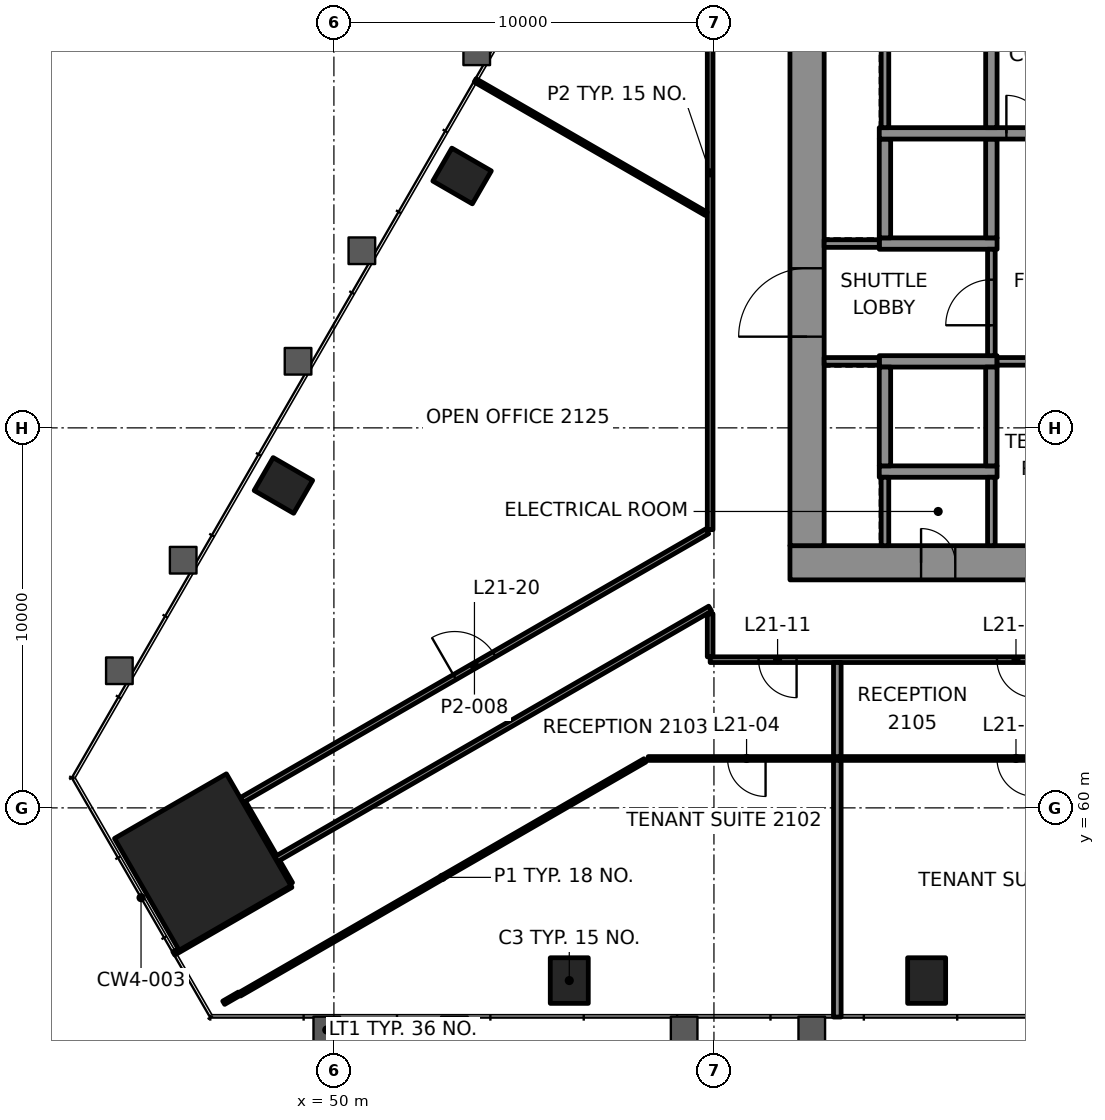
"""IFC4 building model, lengths in metres.
Left out: names, types, materials, properties, quantities, classifications, styles, units other than length and angle.
Written with IfcOpenShell. Run it as: python <this file> out.ifc"""

import sys

from ifc_helpers import new_model, si_unit, direction, frame, frame_2d, origin, origin_2d, place, context, subcontext, project, spatial, rectangle, extrude, element, fill, save


model = new_model("IFC4")
c1 = context("Model", 3, precision=1e-05, world=origin(), true_north=direction((0.0, 1.0)))
c2 = subcontext(c1, "Body", "Model", "MODEL_VIEW")
j1 = project(units=[si_unit("LENGTHUNIT", "METRE"), si_unit("PLANEANGLEUNIT", "RADIAN")], contexts=[c1])
p1 = place(None, origin())
s1 = spatial("IfcSite", under=j1, at=p1, CompositionType="ELEMENT")
p2 = place(p1, origin())
s2 = spatial("IfcBuilding", under=s1, at=p2, CompositionType="ELEMENT")
p3 = place(p2, frame((0.0, 0.0, 94.6)))
s3 = spatial("IfcBuildingStorey", under=s2, at=p3, CompositionType="ELEMENT", Elevation=94.6)
p4 = place(p3, frame((46.549, 58.574, 0.0), z_axis=(0.0, 0.0, 1.0), x_axis=(0.5, -0.866025403784, 0.0)))
e1 = element("IfcColumn", 1, at=p4, inside=s3, PredefinedType="COLUMN", context=c2, shape_type="SweptSolid", body=[
    extrude(rectangle(XDim=3.4, YDim=3.4, at=origin_2d()), origin(), (0.0, 0.0, 1.0), 4.2),
])
for number, where, z_axis, x_axis in (
    (2, (56.193, 55.456, -0.0), (0.0, 0.0, 1.0), (1.0, 0.0, 0.0)),
    (3, (65.597, 55.456, -0.0), (0.0, 0.0, 1.0), (1.0, 0.0, 0.0)),
    (4, (53.373, 76.628, -0.0), (0.0, 0.0, 1.0), (-0.5, -0.866, 0.0)),
    (5, (48.671, 68.485, -0.0), (0.0, 0.0, 1.0), (-0.5, -0.866, 0.0)),
):
    element("IfcColumn", number, at=place(p3, frame(where, z_axis=z_axis, x_axis=x_axis)), inside=s3, PredefinedType="COLUMN", context=c2, shape_type="SweptSolid", body=[
        extrude(rectangle(XDim=1.0, YDim=1.2, at=origin_2d()), origin(), (0.0, 0.0, 1.0), 4.2),
    ])
p5 = place(p3, frame((62.0, 66.45, 0.0), z_axis=(0.0, 0.0, 1.0), x_axis=(1.0, 0.0, 0.0)))
e6 = element("IfcWall", 6, at=p5, inside=s3, PredefinedType="SHEAR", context=c2, shape_type="SweptSolid", body=[
    extrude(rectangle(XDim=26.0, YDim=0.9, at=frame_2d((13.0, 0.0))), origin(), (0.0, 0.0, 1.0), 4.0),
])
p6 = place(p5, frame((3.45, 0.0, 0.0)))
e7 = element("IfcOpeningElement", 7, at=p6, cuts=e6, PredefinedType="OPENING", context=c2, shape_type="SweptSolid", body=[
    extrude(rectangle(XDim=0.9, YDim=2.1, at=frame_2d((0.45, 1.05))), frame((0.0, 0.46, 0.0), z_axis=(0.0, -1.0, 0.0), x_axis=(1.0, 0.0, 0.0)), (0.0, 0.0, 1.0), 0.92),
])
p7 = place(p5, frame((6.425, 0.0, 0.0)))
e8 = element("IfcOpeningElement", 8, at=p7, cuts=e6, PredefinedType="OPENING", context=c2, shape_type="SweptSolid", body=[
    extrude(rectangle(XDim=0.9, YDim=2.1, at=frame_2d((0.45, 1.05))), frame((0.0, 0.46, 0.0), z_axis=(0.0, -1.0, 0.0), x_axis=(1.0, 0.0, 0.0)), (0.0, 0.0, 1.0), 0.92),
])
p8 = place(p5, frame((11.5, 0.0, 0.0)))
e9 = element("IfcOpeningElement", 9, at=p8, cuts=e6, PredefinedType="OPENING", context=c2, shape_type="SweptSolid", body=[
    extrude(rectangle(XDim=0.9, YDim=2.1, at=frame_2d((0.45, 1.05))), frame((0.0, 0.46, 0.0), z_axis=(0.0, -1.0, 0.0), x_axis=(1.0, 0.0, 0.0)), (0.0, 0.0, 1.0), 0.92),
])
p9 = place(p5, frame((18.5, 0.0, 0.0)))
e10 = element("IfcOpeningElement", 10, at=p9, cuts=e6, PredefinedType="OPENING", context=c2, shape_type="SweptSolid", body=[
    extrude(rectangle(XDim=0.9, YDim=2.1, at=frame_2d((0.45, 1.05))), frame((0.0, 0.46, 0.0), z_axis=(0.0, -1.0, 0.0), x_axis=(1.0, 0.0, 0.0)), (0.0, 0.0, 1.0), 0.92),
])
p10 = place(p5, frame((23.325, 0.0, 0.0)))
e11 = element("IfcOpeningElement", 11, at=p10, cuts=e6, PredefinedType="OPENING", context=c2, shape_type="SweptSolid", body=[
    extrude(rectangle(XDim=0.9, YDim=2.1, at=frame_2d((0.45, 1.05))), frame((0.0, 0.46, 0.0), z_axis=(0.0, -1.0, 0.0), x_axis=(1.0, 0.0, 0.0)), (0.0, 0.0, 1.0), 0.92),
])
p11 = place(p3, frame((62.45, 66.9, 0.0), z_axis=(0.0, 0.0, 1.0), x_axis=(0.0, 1.0, 0.0)))
e12 = element("IfcWall", 12, at=p11, inside=s3, PredefinedType="SHEAR", context=c2, shape_type="SweptSolid", body=[
    extrude(rectangle(XDim=16.2, YDim=0.9, at=frame_2d((8.1, 0.0))), origin(), (0.0, 0.0, 1.0), 4.0),
])
p12 = place(p11, frame((5.5, 0.0, 0.0)))
e13 = element("IfcOpeningElement", 13, at=p12, cuts=e12, PredefinedType="OPENING", context=c2, shape_type="SweptSolid", body=[
    extrude(rectangle(XDim=1.8, YDim=2.1, at=frame_2d((0.9, 1.05))), frame((0.0, 0.46, 0.0), z_axis=(0.0, -1.0, 0.0), x_axis=(1.0, 0.0, 0.0)), (0.0, 0.0, 1.0), 0.92),
])
for number, where, z_axis, x_axis in (
    (14, (64.35, 68.85, 0.0), (0.0, 0.0, 1.0), (1.0, 0.0, 0.0)),
    (15, (64.35, 71.75, 0.0), (0.0, 0.0, 1.0), (1.0, 0.0, 0.0)),
    (16, (64.35, 74.85, 0.0), (0.0, 0.0, 1.0), (1.0, 0.0, 0.0)),
):
    element("IfcWall", number, at=place(p3, frame(where, z_axis=z_axis, x_axis=x_axis)), inside=s3, PredefinedType="SHEAR", context=c2, shape_type="SweptSolid", body=[
        extrude(rectangle(XDim=3.1, YDim=0.3, at=frame_2d((1.55, 0.0))), origin(), (0.0, 0.0, 1.0), 4.0),
    ])
for number, where, z_axis, x_axis in (
    (17, (64.5, 69.0, 0.0), (0.0, 0.0, 1.0), (0.0, 1.0, 0.0)),
    (18, (64.5, 75.0, 0.0), (0.0, 0.0, 1.0), (0.0, 1.0, 0.0)),
    (19, (67.3, 69.0, 0.0), (0.0, 0.0, 1.0), (0.0, 1.0, 0.0)),
    (20, (67.3, 75.0, 0.0), (0.0, 0.0, 1.0), (0.0, 1.0, 0.0)),
):
    element("IfcWall", number, at=place(p3, frame(where, z_axis=z_axis, x_axis=x_axis)), inside=s3, PredefinedType="SHEAR", context=c2, shape_type="SweptSolid", body=[
        extrude(rectangle(XDim=2.6, YDim=0.3, at=frame_2d((1.3, 0.0))), origin(), (0.0, 0.0, 1.0), 4.0),
    ])
p13 = place(p3, frame((64.35, 77.75, 0.0), z_axis=(0.0, 0.0, 1.0), x_axis=(1.0, 0.0, 0.0)))
e21 = element("IfcWall", 21, at=p13, inside=s3, PredefinedType="SHEAR", context=c2, shape_type="SweptSolid", body=[
    extrude(rectangle(XDim=22.75, YDim=0.3, at=frame_2d((11.375, 0.0))), origin(), (0.0, 0.0, 1.0), 4.0),
])
p14 = place(p13, frame((3.345, 0.0, 0.0)))
e22 = element("IfcOpeningElement", 22, at=p14, cuts=e21, PredefinedType="OPENING", context=c2, shape_type="SweptSolid", body=[
    extrude(rectangle(XDim=1.0, YDim=2.1, at=frame_2d((0.5, 1.05))), frame((0.0, 0.16, 0.0), z_axis=(0.0, -1.0, 0.0), x_axis=(1.0, 0.0, 0.0)), (0.0, 0.0, 1.0), 0.32),
])
p15 = place(p3, frame((67.3, 77.9, 0.0), z_axis=(0.0, 0.0, 1.0), x_axis=(0.0, 1.0, 0.0)))
e23 = element("IfcWall", 23, at=p15, inside=s3, PredefinedType="SHEAR", context=c2, shape_type="SweptSolid", body=[
    extrude(rectangle(XDim=3.08, YDim=0.3, at=frame_2d((1.54, 0.0))), origin(), (0.0, 0.0, 1.0), 4.0),
])
p16 = place(p3, frame((84.403, 61.3, 0.0), z_axis=(0.0, 0.0, 1.0), x_axis=(-1.0, 0.0, 0.0)))
e24 = element("IfcWall", 24, at=p16, inside=s3, PredefinedType="PARTITIONING", context=c2, shape_type="SweptSolid", body=[
    extrude(rectangle(XDim=26.132, YDim=0.1, at=frame_2d((13.066, 0.0))), origin(), (0.0, 0.0, 1.0), 3.4),
])
p17 = place(p16, frame((2.59, 0.0, 0.0)))
e25 = element("IfcOpeningElement", 25, at=p17, cuts=e24, PredefinedType="OPENING", context=c2, shape_type="SweptSolid", body=[
    extrude(rectangle(XDim=0.9, YDim=2.1, at=frame_2d((0.45, 1.05))), frame((0.0, 0.06, 0.0), z_axis=(0.0, -1.0, 0.0), x_axis=(1.0, 0.0, 0.0)), (0.0, 0.0, 1.0), 0.12),
])
p18 = place(p16, frame((8.364, 0.0, 0.0)))
e26 = element("IfcOpeningElement", 26, at=p18, cuts=e24, PredefinedType="OPENING", context=c2, shape_type="SweptSolid", body=[
    extrude(rectangle(XDim=0.9, YDim=2.1, at=frame_2d((0.45, 1.05))), frame((0.0, 0.06, 0.0), z_axis=(0.0, -1.0, 0.0), x_axis=(1.0, 0.0, 0.0)), (0.0, 0.0, 1.0), 0.12),
])
p19 = place(p16, frame((15.956, 0.0, 0.0)))
e27 = element("IfcOpeningElement", 27, at=p19, cuts=e24, PredefinedType="OPENING", context=c2, shape_type="SweptSolid", body=[
    extrude(rectangle(XDim=1.0, YDim=2.1, at=frame_2d((0.5, 1.05))), frame((0.0, 0.06, 0.0), z_axis=(0.0, -1.0, 0.0), x_axis=(1.0, 0.0, 0.0)), (0.0, 0.0, 1.0), 0.12),
])
p20 = place(p16, frame((23.045, 0.0, 0.0)))
e28 = element("IfcOpeningElement", 28, at=p20, cuts=e24, PredefinedType="OPENING", context=c2, shape_type="SweptSolid", body=[
    extrude(rectangle(XDim=1.0, YDim=2.1, at=frame_2d((0.5, 1.05))), frame((0.0, 0.06, 0.0), z_axis=(0.0, -1.0, 0.0), x_axis=(1.0, 0.0, 0.0)), (0.0, 0.0, 1.0), 0.12),
])
p21 = place(p3, frame((90.1, 63.9, 0.0), z_axis=(0.0, 0.0, 1.0), x_axis=(-1.0, 0.0, 0.0)))
e29 = element("IfcWall", 29, at=p21, inside=s3, PredefinedType="PARTITIONING", context=c2, shape_type="SweptSolid", body=[
    extrude(rectangle(XDim=30.2, YDim=0.15, at=frame_2d((15.1, 0.0))), origin(), (0.0, 0.0, 1.0), 3.4),
])
p22 = place(p21, frame((2.35, 0.0, 0.0)))
e30 = element("IfcOpeningElement", 30, at=p22, cuts=e29, PredefinedType="OPENING", context=c2, shape_type="SweptSolid", body=[
    extrude(rectangle(XDim=1.2, YDim=2.1, at=frame_2d((0.6, 1.05))), frame((0.0, 0.085, 0.0), z_axis=(0.0, -1.0, 0.0), x_axis=(1.0, 0.0, 0.0)), (0.0, 0.0, 1.0), 0.17),
])
p23 = place(p21, frame((11.074, 0.0, 0.0)))
e31 = element("IfcOpeningElement", 31, at=p23, cuts=e29, PredefinedType="OPENING", context=c2, shape_type="SweptSolid", body=[
    extrude(rectangle(XDim=1.0, YDim=2.1, at=frame_2d((0.5, 1.05))), frame((0.0, 0.085, 0.0), z_axis=(0.0, -1.0, 0.0), x_axis=(1.0, 0.0, 0.0)), (0.0, 0.0, 1.0), 0.17),
])
p24 = place(p21, frame((21.653, 0.0, 0.0)))
e32 = element("IfcOpeningElement", 32, at=p24, cuts=e29, PredefinedType="OPENING", context=c2, shape_type="SweptSolid", body=[
    extrude(rectangle(XDim=1.0, YDim=2.1, at=frame_2d((0.5, 1.05))), frame((0.0, 0.085, 0.0), z_axis=(0.0, -1.0, 0.0), x_axis=(1.0, 0.0, 0.0)), (0.0, 0.0, 1.0), 0.17),
])
p25 = place(p21, frame((27.925, 0.0, 0.0)))
e33 = element("IfcOpeningElement", 33, at=p25, cuts=e29, PredefinedType="OPENING", context=c2, shape_type="SweptSolid", body=[
    extrude(rectangle(XDim=1.0, YDim=2.1, at=frame_2d((0.5, 1.05))), frame((0.0, 0.085, 0.0), z_axis=(0.0, -1.0, 0.0), x_axis=(1.0, 0.0, 0.0)), (0.0, 0.0, 1.0), 0.17),
])
p26 = place(p3, frame((47.519, 55.093, 0.0), z_axis=(0.0, 0.0, 1.0), x_axis=(0.866028767292, 0.499994174189, 0.0)))
e34 = element("IfcWall", 34, at=p26, inside=s3, PredefinedType="PARTITIONING", context=c2, shape_type="SweptSolid", body=[
    extrude(rectangle(XDim=12.315, YDim=0.1, at=frame_2d((6.157, 0.0))), origin(), (0.0, 0.0, 1.0), 3.4),
])
p27 = place(p3, frame((47.1, 54.873, 0.0), z_axis=(0.0, 0.0, 1.0), x_axis=(0.865944638795, 0.50013986298, 0.0)))
e35 = element("IfcWall", 35, at=p27, inside=s3, PredefinedType="PARTITIONING", context=c2, shape_type="SweptSolid", body=[
    extrude(rectangle(XDim=0.472, YDim=0.1, at=frame_2d((0.236, 0.0))), origin(), (0.0, 0.0, 1.0), 3.4),
])
p28 = place(p3, frame((45.788, 56.171, 0.0), z_axis=(0.0, 0.0, 1.0), x_axis=(0.866031398331, 0.499989616998, 0.0)))
e36 = element("IfcWall", 36, at=p28, inside=s3, PredefinedType="PARTITIONING", context=c2, shape_type="SweptSolid", body=[
    extrude(rectangle(XDim=3.56, YDim=0.1, at=frame_2d((1.78, 0.0))), origin(), (0.0, 0.0, 1.0), 3.4),
])
p29 = place(p3, frame((48.471, 58.644, 0.0), z_axis=(0.0, 0.0, 1.0), x_axis=(0.86602138367, 0.500006962977, 0.0)))
e37 = element("IfcWall", 37, at=p29, inside=s3, PredefinedType="PARTITIONING", context=c2, shape_type="SweptSolid", body=[
    extrude(rectangle(XDim=13.197, YDim=0.15, at=frame_2d((6.599, 0.0))), origin(), (0.0, 0.0, 1.0), 3.247),
])
p30 = place(p3, frame((47.571, 60.203, 0.0), z_axis=(0.0, 0.0, 1.0), x_axis=(0.866023815059, 0.500002751744, 0.0)))
e38 = element("IfcWall", 38, at=p30, inside=s3, PredefinedType="PARTITIONING", context=c2, shape_type="SweptSolid", body=[
    extrude(rectangle(XDim=14.149, YDim=0.15, at=frame_2d((7.075, 0.0))), origin(), (0.0, 0.0, 1.0), 3.4),
])
p31 = place(p30, frame((6.475, 0.0, 0.0)))
e39 = element("IfcOpeningElement", 39, at=p31, cuts=e38, PredefinedType="OPENING", context=c2, shape_type="SweptSolid", body=[
    extrude(rectangle(XDim=1.2, YDim=2.1, at=frame_2d((0.6, 1.05))), frame((0.0, 0.085, 0.0), z_axis=(0.0, -1.0, 0.0), x_axis=(1.0, 0.0, 0.0)), (0.0, 0.0, 1.0), 0.17),
])
p32 = place(p3, frame((63.246, 54.496, 0.0), z_axis=(0.0, 0.0, 1.0), x_axis=(0.0, 1.0, 0.0)))
e40 = element("IfcWall", 40, at=p32, inside=s3, PredefinedType="PARTITIONING", context=c2, shape_type="SweptSolid", body=[
    extrude(rectangle(XDim=6.754, YDim=0.2, at=frame_2d((3.377, 0.0))), origin(), (0.0, 0.0, 1.0), 3.165),
])
p33 = place(p3, frame((59.9, 63.976, 0.0), z_axis=(0.0, 0.0, 1.0), x_axis=(0.0, 1.0, 0.0)))
e41 = element("IfcWall", 41, at=p33, inside=s3, PredefinedType="PARTITIONING", context=c2, shape_type="SweptSolid", body=[
    extrude(rectangle(XDim=1.131, YDim=0.15, at=frame_2d((0.565, 0.0))), origin(), (0.0, 0.0, 1.0), 3.247),
])
p34 = place(p3, frame((59.9, 67.321, 0.0), z_axis=(0.0, 0.0, 1.0), x_axis=(0.0, 1.0, 0.0)))
e42 = element("IfcWall", 42, at=p34, inside=s3, PredefinedType="PARTITIONING", context=c2, shape_type="SweptSolid", body=[
    extrude(rectangle(XDim=18.778, YDim=0.15, at=frame_2d((9.389, 0.0))), origin(), (0.0, 0.0, 1.0), 3.4),
])
p35 = place(p3, frame((48.845, 57.995, 0.0), z_axis=(0.0, 0.0, 1.0), x_axis=(-0.499837337514, 0.866119296648, 0.0)))
e43 = element("IfcWall", 43, at=p35, inside=s3, PredefinedType="PARTITIONING", context=c2, shape_type="SweptSolid", body=[
    extrude(rectangle(XDim=0.675, YDim=0.15, at=frame_2d((0.337, 0.0))), origin(), (0.0, 0.0, 1.0), 3.4),
])
p36 = place(p3, frame((59.799, 75.632, 0.0), z_axis=(0.0, 0.0, 1.0), x_axis=(-0.866018287837, 0.500012324981, 0.0)))
e44 = element("IfcWall", 44, at=p36, inside=s3, PredefinedType="PARTITIONING", context=c2, shape_type="SweptSolid", body=[
    extrude(rectangle(XDim=7.023, YDim=0.1, at=frame_2d((3.512, 0.0))), origin(), (0.0, 0.0, 1.0), 3.165),
])
p37 = place(p3, frame((48.433, 58.709, 0.0), z_axis=(0.0, 0.0, 1.0), x_axis=(-0.500055614084, 0.865993292597, 0.0)))
e45 = element("IfcWall", 45, at=p37, inside=s3, PredefinedType="PARTITIONING", context=c2, shape_type="SweptSolid", body=[
    extrude(rectangle(XDim=1.649, YDim=0.15, at=frame_2d((0.825, 0.0))), origin(), (0.0, 0.0, 1.0), 3.247),
])
p38 = place(p3, frame((63.246, 61.35, 0.0), z_axis=(0.0, 0.0, 1.0), x_axis=(0.0, 1.0, 0.0)))
e46 = element("IfcWall", 46, at=p38, inside=s3, PredefinedType="PARTITIONING", context=c2, shape_type="SweptSolid", body=[
    extrude(rectangle(XDim=2.475, YDim=0.2, at=frame_2d((1.237, 0.0))), origin(), (0.0, 0.0, 1.0), 3.4),
])
p39 = place(p3, frame((62.9, 71.75, 0.0), z_axis=(0.0, 0.0, 1.0), x_axis=(1.0, 0.0, 0.0)))
e47 = element("IfcWall", 47, at=p39, inside=s3, PredefinedType="PARTITIONING", context=c2, shape_type="SweptSolid", body=[
    extrude(rectangle(XDim=1.45, YDim=0.2, at=frame_2d((0.725, 0.0))), origin(), (0.0, 0.0, 1.0), 4.0),
])
p40 = place(p3, frame((67.45, 71.75, 0.0), z_axis=(0.0, 0.0, 1.0), x_axis=(1.0, 0.0, 0.0)))
e48 = element("IfcWall", 48, at=p40, inside=s3, PredefinedType="PARTITIONING", context=c2, shape_type="SweptSolid", body=[
    extrude(rectangle(XDim=2.85, YDim=0.2, at=frame_2d((1.425, 0.0))), origin(), (0.0, 0.0, 1.0), 4.0),
])
p41 = place(p3, frame((62.9, 74.85, 0.0), z_axis=(0.0, 0.0, 1.0), x_axis=(1.0, 0.0, 0.0)))
e49 = element("IfcWall", 49, at=p41, inside=s3, PredefinedType="PARTITIONING", context=c2, shape_type="SweptSolid", body=[
    extrude(rectangle(XDim=1.45, YDim=0.2, at=frame_2d((0.725, 0.0))), origin(), (0.0, 0.0, 1.0), 4.0),
])
p42 = place(p3, frame((64.5, 66.9, 0.0), z_axis=(0.0, 0.0, 1.0), x_axis=(0.0, 1.0, 0.0)))
e50 = element("IfcWall", 50, at=p42, inside=s3, PredefinedType="PARTITIONING", context=c2, shape_type="SweptSolid", body=[
    extrude(rectangle(XDim=1.8, YDim=0.2, at=frame_2d((0.9, 0.0))), origin(), (0.0, 0.0, 1.0), 4.0),
])
p43 = place(p3, frame((64.5, 77.9, 0.0), z_axis=(0.0, 0.0, 1.0), x_axis=(0.0, 1.0, 0.0)))
e51 = element("IfcWall", 51, at=p43, inside=s3, PredefinedType="PARTITIONING", context=c2, shape_type="SweptSolid", body=[
    extrude(rectangle(XDim=5.2, YDim=0.2, at=frame_2d((2.6, 0.0))), origin(), (0.0, 0.0, 1.0), 4.0),
])
p44 = place(p3, frame((67.3, 66.9, 0.0), z_axis=(0.0, 0.0, 1.0), x_axis=(0.0, 1.0, 0.0)))
e52 = element("IfcWall", 52, at=p44, inside=s3, PredefinedType="PARTITIONING", context=c2, shape_type="SweptSolid", body=[
    extrude(rectangle(XDim=1.8, YDim=0.2, at=frame_2d((0.9, 0.0))), origin(), (0.0, 0.0, 1.0), 4.0),
])
p45 = place(p3, frame((67.3, 71.9, 0.0), z_axis=(0.0, 0.0, 1.0), x_axis=(0.0, 1.0, 0.0)))
e53 = element("IfcWall", 53, at=p45, inside=s3, PredefinedType="PARTITIONING", context=c2, shape_type="SweptSolid", body=[
    extrude(rectangle(XDim=2.8, YDim=0.2, at=frame_2d((1.4, 0.0))), origin(), (0.0, 0.0, 1.0), 4.0),
])
p46 = place(p45, frame((0.8, 0.0, 0.0)))
e54 = element("IfcOpeningElement", 54, at=p46, cuts=e53, PredefinedType="OPENING", context=c2, shape_type="SweptSolid", body=[
    extrude(rectangle(XDim=1.2, YDim=2.1, at=frame_2d((0.6, 1.05))), frame((0.0, 0.11, 0.0), z_axis=(0.0, -1.0, 0.0), x_axis=(1.0, 0.0, 0.0)), (0.0, 0.0, 1.0), 0.22),
])
p47 = place(p19, origin())
e55 = element("IfcDoor", 55, at=p47, inside=s3, OperationType="SINGLE_SWING_RIGHT", PredefinedType="DOOR", context=c2, shape_type="SweptSolid", body=[
    extrude(rectangle(XDim=1.0, YDim=2.1, at=frame_2d((0.5, 1.05))), frame((0.0, 0.025, 0.0), z_axis=(0.0, -1.0, 0.0), x_axis=(1.0, 0.0, 0.0)), (0.0, 0.0, 1.0), 0.05),
])
fill(e27, e55)
p48 = place(p20, origin())
e56 = element("IfcDoor", 56, at=p48, inside=s3, OperationType="SINGLE_SWING_RIGHT", PredefinedType="DOOR", context=c2, shape_type="SweptSolid", body=[
    extrude(rectangle(XDim=1.0, YDim=2.1, at=frame_2d((0.5, 1.05))), frame((0.0, 0.025, 0.0), z_axis=(0.0, -1.0, 0.0), x_axis=(1.0, 0.0, 0.0)), (0.0, 0.0, 1.0), 0.05),
])
fill(e28, e56)
p49 = place(p24, origin())
e57 = element("IfcDoor", 57, at=p49, inside=s3, OperationType="SINGLE_SWING_LEFT", PredefinedType="DOOR", context=c2, shape_type="SweptSolid", body=[
    extrude(rectangle(XDim=1.0, YDim=2.1, at=frame_2d((0.5, 1.05))), frame((0.0, 0.025, 0.0), z_axis=(0.0, -1.0, 0.0), x_axis=(1.0, 0.0, 0.0)), (0.0, 0.0, 1.0), 0.05),
])
fill(e32, e57)
p50 = place(p25, origin())
e58 = element("IfcDoor", 58, at=p50, inside=s3, OperationType="SINGLE_SWING_LEFT", PredefinedType="DOOR", context=c2, shape_type="SweptSolid", body=[
    extrude(rectangle(XDim=1.0, YDim=2.1, at=frame_2d((0.5, 1.05))), frame((0.0, 0.025, 0.0), z_axis=(0.0, -1.0, 0.0), x_axis=(1.0, 0.0, 0.0)), (0.0, 0.0, 1.0), 0.05),
])
fill(e33, e58)
p51 = place(p31, origin())
e59 = element("IfcDoor", 59, at=p51, inside=s3, OperationType="DOUBLE_DOOR_SINGLE_SWING", PredefinedType="DOOR", context=c2, shape_type="SweptSolid", body=[
    extrude(rectangle(XDim=1.2, YDim=2.1, at=frame_2d((0.6, 1.05))), frame((0.0, 0.025, 0.0), z_axis=(0.0, -1.0, 0.0), x_axis=(1.0, 0.0, 0.0)), (0.0, 0.0, 1.0), 0.05),
])
fill(e39, e59)
p52 = place(p14, origin())
e60 = element("IfcDoor", 60, at=p52, inside=s3, OperationType="SINGLE_SWING_LEFT", PredefinedType="DOOR", context=c2, shape_type="SweptSolid", body=[
    extrude(rectangle(XDim=1.0, YDim=2.1, at=frame_2d((0.5, 1.05))), frame((0.0, 0.025, 0.0), z_axis=(0.0, -1.0, 0.0), x_axis=(1.0, 0.0, 0.0)), (0.0, 0.0, 1.0), 0.05),
])
fill(e22, e60)
p53 = place(p46, origin())
e61 = element("IfcDoor", 61, at=p53, inside=s3, OperationType="SINGLE_SWING_RIGHT", PredefinedType="DOOR", context=c2, shape_type="SweptSolid", body=[
    extrude(rectangle(XDim=1.2, YDim=2.1, at=frame_2d((0.6, 1.05))), frame((0.0, 0.025, 0.0), z_axis=(0.0, -1.0, 0.0), x_axis=(1.0, 0.0, 0.0)), (0.0, 0.0, 1.0), 0.05),
])
fill(e54, e61)
p54 = place(p12, origin())
e62 = element("IfcDoor", 62, at=p54, inside=s3, OperationType="SINGLE_SWING_LEFT", PredefinedType="DOOR", context=c2, shape_type="SweptSolid", body=[
    extrude(rectangle(XDim=1.8, YDim=2.1, at=frame_2d((0.9, 1.05))), frame((0.0, 0.17, 0.0), z_axis=(0.0, -1.0, 0.0), x_axis=(1.0, 0.0, 0.0)), (0.0, 0.0, 1.0), 0.34),
])
fill(e13, e62)
p55 = place(p6, origin())
e63 = element("IfcDoor", 63, at=p55, inside=s3, OperationType="SINGLE_SWING_LEFT", PredefinedType="DOOR", context=c2, shape_type="SweptSolid", body=[
    extrude(rectangle(XDim=0.9, YDim=2.1, at=frame_2d((0.45, 1.05))), frame((0.0, 0.17, 0.0), z_axis=(0.0, -1.0, 0.0), x_axis=(1.0, 0.0, 0.0)), (0.0, 0.0, 1.0), 0.34),
])
fill(e7, e63)
save(model, sys.argv[1])
